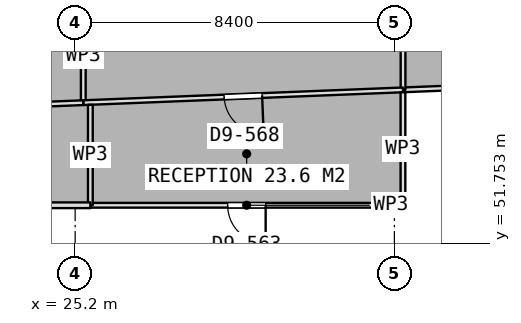
"""IFC4 building model, lengths in metres.
Left out: names, types, materials, properties, quantities, classifications, styles, units other than length and angle.
Written with IfcOpenShell. Run it as: python <this file> out.ifc"""

import sys

from ifc_helpers import new_model, si_unit, direction, frame, frame_2d, origin, place, context, subcontext, project, spatial, rectangle, extrude, element, fill, save


model = new_model("IFC4")
c1 = context("Model", 3, precision=1e-05, world=origin(), true_north=direction((0.0, 1.0)))
c2 = subcontext(c1, "Body", "Model", "MODEL_VIEW")
j1 = project(units=[si_unit("LENGTHUNIT", "METRE"), si_unit("PLANEANGLEUNIT", "RADIAN")], contexts=[c1])
p1 = place(None, origin())
s1 = spatial("IfcSite", under=j1, at=p1, CompositionType="ELEMENT")
p2 = place(p1, origin())
s2 = spatial("IfcBuilding", under=s1, at=p2, CompositionType="ELEMENT")
p3 = place(p2, frame((0.0, 0.0, 140.3)))
s3 = spatial("IfcBuildingStorey", under=s2, at=p3, CompositionType="ELEMENT", Elevation=140.3)
p4 = place(p3, frame((35.059, 55.836, 0.0), z_axis=(0.0, 0.0, 1.0), x_axis=(-0.999174794796, -0.040616861577, 0.0)))
e1 = element("IfcWall", 1, at=p4, inside=s3, PredefinedType="PARTITIONING", context=c2, shape_type="SweptSolid", body=[
    extrude(rectangle(XDim=1.232, YDim=0.125, at=frame_2d((0.616, 0.0))), origin(), (0.0, 0.0, 1.0), 3.5),
])
p5 = place(p3, frame((33.828, 55.786, 0.0), z_axis=(0.0, 0.0, 1.0), x_axis=(0.0, 1.0, 0.0)))
e2 = element("IfcWall", 2, at=p5, inside=s3, PredefinedType="PARTITIONING", context=c2, shape_type="SweptSolid", body=[
    extrude(rectangle(XDim=2.144, YDim=0.125, at=frame_2d((1.072, 0.0))), origin(), (0.0, 0.0, 1.0), 3.5),
])
p6 = place(p3, frame((25.414, 55.449, 0.0), z_axis=(0.0, 0.0, 1.0), x_axis=(0.0, 1.0, 0.0)))
e3 = element("IfcWall", 3, at=p6, inside=s3, PredefinedType="PARTITIONING", context=c2, shape_type="SweptSolid", body=[
    extrude(rectangle(XDim=2.481, YDim=0.125, at=frame_2d((1.24, 0.0))), origin(), (0.0, 0.0, 1.0), 3.5),
])
p7 = place(p3, frame((33.827, 55.786, 0.0), z_axis=(0.0, 0.0, 1.0), x_axis=(-0.999199058446, -0.04001551701, 0.0)))
e4 = element("IfcWall", 4, at=p7, inside=s3, PredefinedType="PARTITIONING", context=c2, shape_type="SweptSolid", body=[
    extrude(rectangle(XDim=8.42, YDim=0.125, at=frame_2d((4.21, 0.0))), origin(), (0.0, 0.0, 1.0), 3.5),
])
p8 = place(p7, frame((3.71, 0.0, 0.0)))
e5 = element("IfcOpeningElement", 5, at=p8, cuts=e4, PredefinedType="OPENING", context=c2, shape_type="SweptSolid", body=[
    extrude(rectangle(XDim=1.0, YDim=2.1, at=frame_2d((0.5, 1.05))), frame((0.0, 0.073, 0.0), z_axis=(0.0, -1.0, 0.0), x_axis=(1.0, 0.0, 0.0)), (0.0, 0.0, 1.0), 0.145),
])
p9 = place(p3, frame((33.826, 55.723, 0.0), z_axis=(0.0, 0.0, 1.0), x_axis=(0.0, -1.0, 0.0)))
e6 = element("IfcWall", 6, at=p9, inside=s3, PredefinedType="PARTITIONING", context=c2, shape_type="SweptSolid", body=[
    extrude(rectangle(XDim=2.973, YDim=0.125, at=frame_2d((1.486, 0.0))), origin(), (0.0, 0.0, 1.0), 3.5),
])
p10 = place(p3, frame((33.826, 52.75, 0.0), z_axis=(0.0, 0.0, 1.0), x_axis=(-1.0, 0.0, 0.0)))
e7 = element("IfcWall", 7, at=p10, inside=s3, PredefinedType="PARTITIONING", context=c2, shape_type="SweptSolid", body=[
    extrude(rectangle(XDim=8.226, YDim=0.125, at=frame_2d((4.113, 0.0))), origin(), (0.0, 0.0, 1.0), 3.5),
])
p11 = place(p10, frame((3.613, 0.0, 0.0)))
e8 = element("IfcOpeningElement", 8, at=p11, cuts=e7, PredefinedType="OPENING", context=c2, shape_type="SweptSolid", body=[
    extrude(rectangle(XDim=1.0, YDim=2.1, at=frame_2d((0.5, 1.05))), frame((0.0, 0.073, 0.0), z_axis=(0.0, -1.0, 0.0), x_axis=(1.0, 0.0, 0.0)), (0.0, 0.0, 1.0), 0.145),
])
p12 = place(p3, frame((25.6, 52.75, 0.0), z_axis=(0.0, 0.0, 1.0), x_axis=(0.0, 1.0, 0.0)))
e9 = element("IfcWall", 9, at=p12, inside=s3, PredefinedType="PARTITIONING", context=c2, shape_type="SweptSolid", body=[
    extrude(rectangle(XDim=2.644, YDim=0.125, at=frame_2d((1.322, 0.0))), origin(), (0.0, 0.0, 1.0), 3.5),
])
p13 = place(p3, frame((25.413, 55.449, 0.0), z_axis=(0.0, 0.0, 1.0), x_axis=(-0.999198361773, -0.04003290935, 0.0)))
e10 = element("IfcWall", 10, at=p13, inside=s3, PredefinedType="PARTITIONING", context=c2, shape_type="SweptSolid", body=[
    extrude(rectangle(XDim=9.319, YDim=0.125, at=frame_2d((4.659, 0.0))), origin(), (0.0, 0.0, 1.0), 3.5),
])
p14 = place(p13, frame((4.159, 0.0, 0.0)))
e11 = element("IfcOpeningElement", 11, at=p14, cuts=e10, PredefinedType="OPENING", context=c2, shape_type="SweptSolid", body=[
    extrude(rectangle(XDim=1.0, YDim=2.1, at=frame_2d((0.5, 1.05))), frame((0.0, 0.073, 0.0), z_axis=(0.0, -1.0, 0.0), x_axis=(1.0, 0.0, 0.0)), (0.0, 0.0, 1.0), 0.145),
])
p15 = place(p3, frame((25.6, 52.75, 0.0), z_axis=(0.0, 0.0, 1.0), x_axis=(-1.0, 0.0, 0.0)))
e12 = element("IfcWall", 12, at=p15, inside=s3, PredefinedType="PARTITIONING", context=c2, shape_type="SweptSolid", body=[
    extrude(rectangle(XDim=3.2, YDim=0.15, at=frame_2d((1.6, 0.0))), origin(), (0.0, 0.0, 1.0), 3.5),
])
p16 = place(p11, origin())
e13 = element("IfcDoor", 13, at=p16, inside=s3, OperationType="SINGLE_SWING_LEFT", PredefinedType="DOOR", context=c2, shape_type="SweptSolid", body=[
    extrude(rectangle(XDim=1.0, YDim=2.1, at=frame_2d((0.5, 1.05))), frame((0.0, 0.025, 0.0), z_axis=(0.0, -1.0, 0.0), x_axis=(1.0, 0.0, 0.0)), (0.0, 0.0, 1.0), 0.05),
])
fill(e8, e13)
p17 = place(p8, origin())
e14 = element("IfcDoor", 14, at=p17, inside=s3, OperationType="SINGLE_SWING_LEFT", PredefinedType="DOOR", context=c2, shape_type="SweptSolid", body=[
    extrude(rectangle(XDim=1.0, YDim=2.1, at=frame_2d((0.5, 1.05))), frame((0.0, 0.025, 0.0), z_axis=(0.0, -1.0, 0.0), x_axis=(1.0, 0.0, 0.0)), (0.0, 0.0, 1.0), 0.05),
])
fill(e5, e14)
save(model, sys.argv[1])
